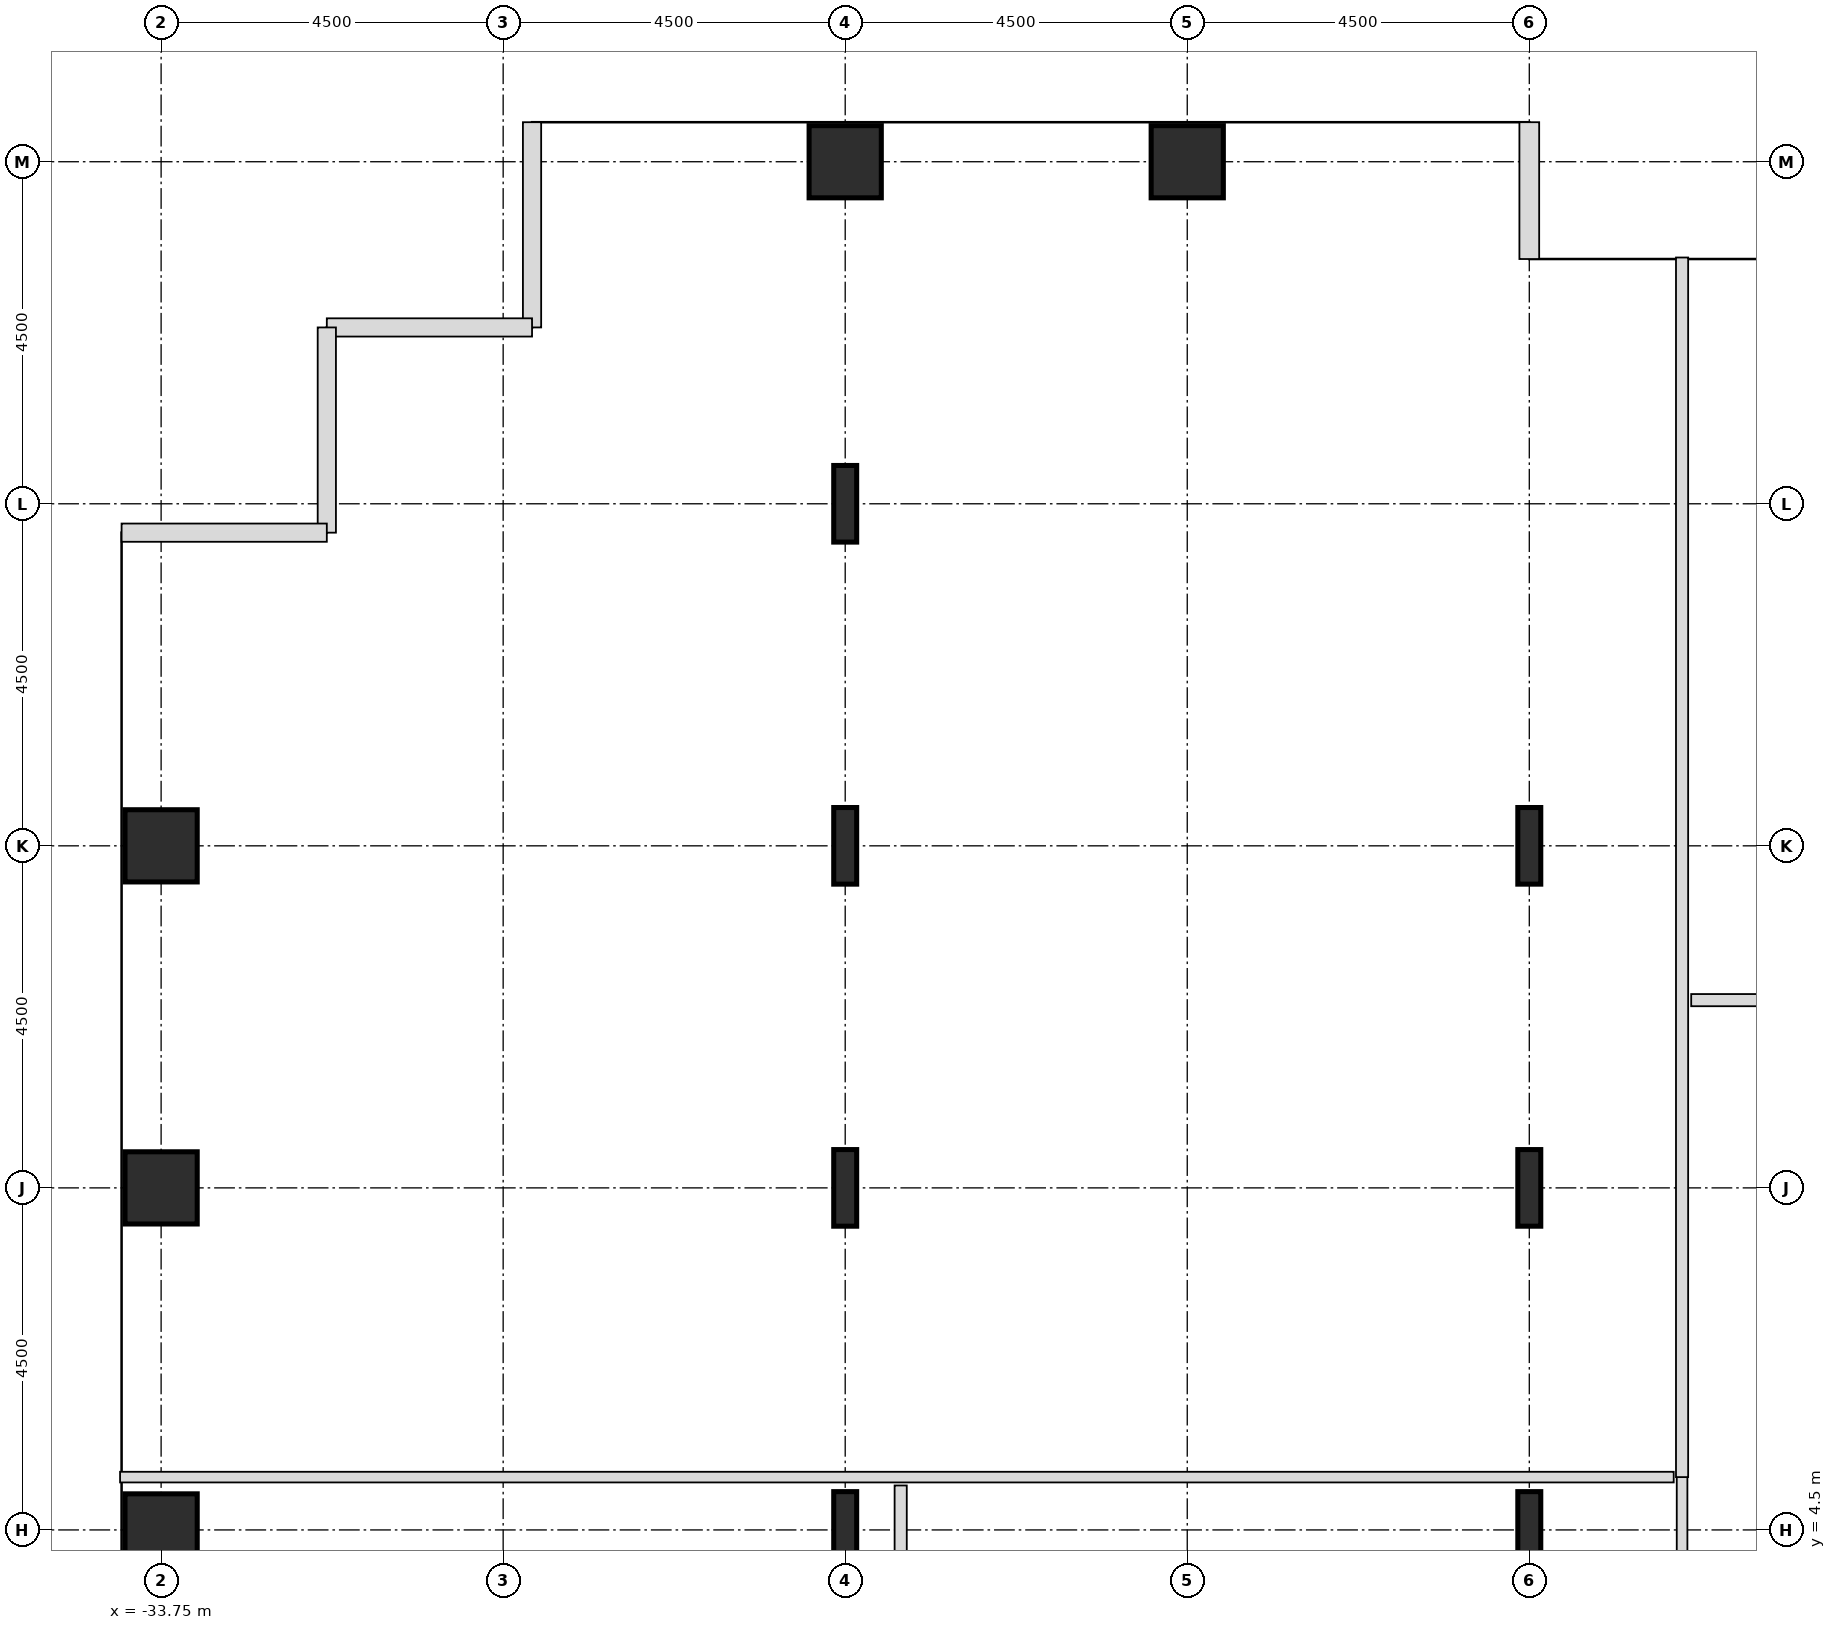
"""IFC4 building model, lengths in metres.
Left out: names, types, materials, properties, quantities, classifications, styles, units other than length and angle.
Written with IfcOpenShell. Run it as: python <this file> out.ifc"""

import sys

from ifc_helpers import new_model, si_unit, direction, frame, frame_2d, origin, origin_2d, place, context, subcontext, project, spatial, rectangle, hollow_rectangle, i_section, extrude, source, transform, mapped, element, fill, save


model = new_model("IFC4")
c1 = context("Model", 3, precision=1e-05, world=origin(), true_north=direction((0.0, 1.0)))
c2 = subcontext(c1, "Body", "Model", "MODEL_VIEW")
j1 = project(units=[si_unit("LENGTHUNIT", "METRE"), si_unit("PLANEANGLEUNIT", "RADIAN")], contexts=[c1])
p1 = place(None, origin())
s1 = spatial("IfcSite", under=j1, at=p1, CompositionType="ELEMENT")
p2 = place(p1, origin())
s2 = spatial("IfcBuilding", under=s1, at=p2, CompositionType="ELEMENT")
p3 = place(p2, frame((0.0, 0.0, 40.6)))
s3 = spatial("IfcBuildingStorey", under=s2, at=p3, CompositionType="ELEMENT", Elevation=40.6)
m1 = source(origin(), c2, "Body", "SweptSolid", [
    extrude(hollow_rectangle(XDim=0.95, YDim=0.95, WallThickness=0.045, InnerFilletRadius=0.045, OuterFilletRadius=0.09, at=origin_2d()), origin(), (0.0, 0.0, 1.0), 3.8),
])
for number, where, z_axis, x_axis in (
    (1, (-33.75, 4.5, 0.0), (0.0, 0.0, 1.0), (1.0, 0.0, 0.0)),
    (2, (-33.75, 9.0, 0.0), (0.0, 0.0, 1.0), (1.0, 0.0, 0.0)),
    (3, (-33.75, 13.5, 0.0), (0.0, 0.0, 1.0), (1.0, 0.0, 0.0)),
):
    element("IfcColumn", number, at=place(p3, frame(where, z_axis=z_axis, x_axis=x_axis)), inside=s3, PredefinedType="COLUMN", context=c2, shape_type="MappedRepresentation", body=[
        mapped(m1, transform((0.0, 0.0, 0.0), x_axis=(1.0, 0.0, 0.0), y_axis=(0.0, 1.0, 0.0), z_axis=(0.0, 0.0, 1.0), scale=1.0)),
    ])
m2 = source(origin(), c2, "Body", "SweptSolid", [
    extrude(i_section(OverallWidth=0.302, OverallDepth=1.008, WebThickness=0.021, FlangeThickness=0.04, FilletRadius=0.03, at=origin_2d()), origin(), (0.0, 0.0, 1.0), 3.8),
])
for number, where, z_axis, x_axis in (
    (4, (-24.75, 4.5, 0.0), (0.0, 0.0, 1.0), (1.0, 0.0, 0.0)),
    (5, (-24.75, 9.0, 0.0), (0.0, 0.0, 1.0), (1.0, 0.0, 0.0)),
    (6, (-24.75, 13.5, 0.0), (0.0, 0.0, 1.0), (1.0, 0.0, 0.0)),
    (7, (-24.75, 18.0, 0.0), (0.0, 0.0, 1.0), (1.0, 0.0, 0.0)),
):
    element("IfcColumn", number, at=place(p3, frame(where, z_axis=z_axis, x_axis=x_axis)), inside=s3, PredefinedType="COLUMN", context=c2, shape_type="MappedRepresentation", body=[
        mapped(m2, transform((0.0, 0.0, 0.0), x_axis=(1.0, 0.0, 0.0), y_axis=(0.0, 1.0, 0.0), z_axis=(0.0, 0.0, 1.0), scale=1.0)),
    ])
for number, where, z_axis, x_axis in (
    (8, (-24.75, 22.5, 0.0), (0.0, 0.0, 1.0), (1.0, 0.0, 0.0)),
    (9, (-20.25, 22.5, 0.0), (0.0, 0.0, 1.0), (1.0, 0.0, 0.0)),
):
    element("IfcColumn", number, at=place(p3, frame(where, z_axis=z_axis, x_axis=x_axis)), inside=s3, PredefinedType="COLUMN", context=c2, shape_type="MappedRepresentation", body=[
        mapped(m1, transform((0.0, 0.0, 0.0), x_axis=(1.0, 0.0, 0.0), y_axis=(0.0, 1.0, 0.0), z_axis=(0.0, 0.0, 1.0), scale=1.0)),
    ])
for number, where, z_axis, x_axis in (
    (10, (-15.75, 4.5, 0.0), (0.0, 0.0, 1.0), (1.0, 0.0, 0.0)),
    (11, (-15.75, 9.0, 0.0), (0.0, 0.0, 1.0), (1.0, 0.0, 0.0)),
    (12, (-15.75, 13.5, 0.0), (0.0, 0.0, 1.0), (1.0, 0.0, 0.0)),
):
    element("IfcColumn", number, at=place(p3, frame(where, z_axis=z_axis, x_axis=x_axis)), inside=s3, PredefinedType="COLUMN", context=c2, shape_type="MappedRepresentation", body=[
        mapped(m2, transform((0.0, 0.0, 0.0), x_axis=(1.0, 0.0, 0.0), y_axis=(0.0, 1.0, 0.0), z_axis=(0.0, 0.0, 1.0), scale=1.0)),
    ])
m3 = source(origin(), c2, "Body", "SweptSolid", [
    extrude(rectangle(XDim=1.8, YDim=0.26, at=frame_2d((0.9, 0.0))), origin(), (0.0, 0.0, 1.0), 3.55),
])
p4 = place(p3, frame((-15.75, 21.22, 0.0), z_axis=(0.0, 0.0, 1.0), x_axis=(0.0, 1.0, 0.0)))
e13 = element("IfcWall", 13, at=p4, inside=s3, PredefinedType="SOLIDWALL", context=c2, shape_type="MappedRepresentation", body=[
    mapped(m3, transform((0.0, 0.0, 0.0), x_axis=(1.0, 0.0, 0.0), y_axis=(0.0, 1.0, 0.0), z_axis=(0.0, 0.0, 1.0), scale=1.0)),
])
m4 = source(origin(), c2, "Body", "SweptSolid", [
    extrude(rectangle(XDim=2.7, YDim=0.24, at=frame_2d((1.35, 0.0))), origin(), (0.0, 0.0, 1.0), 3.55),
])
p5 = place(p3, frame((-28.87, 23.02, 0.0), z_axis=(0.0, 0.0, 1.0), x_axis=(0.0, -1.0, 0.0)))
e14 = element("IfcWall", 14, at=p5, inside=s3, PredefinedType="SHEAR", context=c2, shape_type="MappedRepresentation", body=[
    mapped(m4, transform((0.0, 0.0, 0.0), x_axis=(1.0, 0.0, 0.0), y_axis=(0.0, 1.0, 0.0), z_axis=(0.0, 0.0, 1.0), scale=1.0)),
])
p6 = place(p3, frame((-28.87, 20.32, 0.0), z_axis=(0.0, 0.0, 1.0), x_axis=(-1.0, 0.0, 0.0)))
e15 = element("IfcWall", 15, at=p6, inside=s3, PredefinedType="SHEAR", context=c2, shape_type="MappedRepresentation", body=[
    mapped(m4, transform((0.0, 0.0, 0.0), x_axis=(1.0, 0.0, 0.0), y_axis=(0.0, 1.0, 0.0), z_axis=(0.0, 0.0, 1.0), scale=1.0)),
])
p7 = place(p6, frame((0.75, 0.0, 0.85)))
e16 = element("IfcOpeningElement", 16, at=p7, cuts=e15, PredefinedType="OPENING", context=c2, shape_type="SweptSolid", body=[
    extrude(rectangle(XDim=1.2, YDim=1.8, at=frame_2d((0.6, 0.9))), frame((0.0, 0.13, 0.0), z_axis=(0.0, -1.0, 0.0), x_axis=(1.0, 0.0, 0.0)), (0.0, 0.0, 1.0), 0.26),
])
for number, where, z_axis, x_axis in (
    (17, (-31.57, 20.32, 0.0), (0.0, 0.0, 1.0), (0.0, -1.0, 0.0)),
    (18, (-31.57, 17.62, 0.0), (0.0, 0.0, 1.0), (-1.0, 0.0, 0.0)),
):
    element("IfcWall", number, at=place(p3, frame(where, z_axis=z_axis, x_axis=x_axis)), inside=s3, PredefinedType="SHEAR", context=c2, shape_type="MappedRepresentation", body=[
        mapped(m4, transform((0.0, 0.0, 0.0), x_axis=(1.0, 0.0, 0.0), y_axis=(0.0, 1.0, 0.0), z_axis=(0.0, 0.0, 1.0), scale=1.0)),
    ])
m5 = source(origin(), c2, "Body", "SweptSolid", [
    extrude(rectangle(XDim=6.465, YDim=0.14, at=frame_2d((3.232, 0.0))), origin(), (0.0, 0.0, 1.0), 3.535),
])
p8 = place(p3, frame((-13.74, -1.26, 0.0), z_axis=(0.0, 0.0, 1.0), x_axis=(0.0, 1.0, 0.0)))
e19 = element("IfcWall", 19, at=p8, inside=s3, PredefinedType="PARTITIONING", context=c2, shape_type="MappedRepresentation", body=[
    mapped(m5, transform((0.0, 0.0, 0.0), x_axis=(1.0, 0.0, 0.0), y_axis=(0.0, 1.0, 0.0), z_axis=(0.0, 0.0, 1.0), scale=1.0)),
])
m6 = source(origin(), c2, "Body", "SweptSolid", [
    extrude(rectangle(XDim=20.44, YDim=0.14, at=frame_2d((10.22, 0.0))), origin(), (0.0, 0.0, 1.0), 3.535),
])
p9 = place(p3, frame((-34.29, 5.195, 0.0), z_axis=(0.0, 0.0, 1.0), x_axis=(1.0, 0.0, 0.0)))
e20 = element("IfcWall", 20, at=p9, inside=s3, PredefinedType="PARTITIONING", context=c2, shape_type="MappedRepresentation", body=[
    mapped(m6, transform((0.0, 0.0, 0.0), x_axis=(1.0, 0.0, 0.0), y_axis=(0.0, 1.0, 0.0), z_axis=(0.0, 0.0, 1.0), scale=1.0)),
])
m7 = source(origin(), c2, "Body", "SweptSolid", [
    extrude(rectangle(XDim=13.18, YDim=0.16, at=frame_2d((6.59, 0.0))), origin(), (0.0, 0.0, 1.0), 3.535),
])
p10 = place(p3, frame((-24.02, -8.095, 0.0), z_axis=(0.0, 0.0, 1.0), x_axis=(0.0, 1.0, 0.0)))
e21 = element("IfcWall", 21, at=p10, inside=s3, PredefinedType="PARTITIONING", context=c2, shape_type="MappedRepresentation", body=[
    mapped(m7, transform((0.0, 0.0, 0.0), x_axis=(1.0, 0.0, 0.0), y_axis=(0.0, 1.0, 0.0), z_axis=(0.0, 0.0, 1.0), scale=1.0)),
])
p11 = place(p10, frame((5.37, 0.0, 0.0)))
e22 = element("IfcOpeningElement", 22, at=p11, cuts=e21, PredefinedType="OPENING", context=c2, shape_type="SweptSolid", body=[
    extrude(rectangle(XDim=0.95, YDim=2.1, at=frame_2d((0.475, 1.05))), frame((0.0, 0.09, 0.0), z_axis=(0.0, -1.0, 0.0), x_axis=(1.0, 0.0, 0.0)), (0.0, 0.0, 1.0), 0.18),
])
m8 = source(origin(), c2, "Body", "SweptSolid", [
    extrude(rectangle(XDim=16.045, YDim=0.16, at=frame_2d((8.022, 0.0))), origin(), (0.0, 0.0, 1.0), 3.535),
])
p12 = place(p3, frame((-13.74, 5.195, 0.0), z_axis=(0.0, 0.0, 1.0), x_axis=(0.0, 1.0, 0.0)))
e23 = element("IfcWall", 23, at=p12, inside=s3, PredefinedType="PARTITIONING", context=c2, shape_type="MappedRepresentation", body=[
    mapped(m8, transform((0.0, 0.0, 0.0), x_axis=(1.0, 0.0, 0.0), y_axis=(0.0, 1.0, 0.0), z_axis=(0.0, 0.0, 1.0), scale=1.0)),
])
p13 = place(p12, frame((2.683, 0.0, 0.0)))
e24 = element("IfcOpeningElement", 24, at=p13, cuts=e23, PredefinedType="OPENING", context=c2, shape_type="SweptSolid", body=[
    extrude(rectangle(XDim=0.95, YDim=2.1, at=frame_2d((0.475, 1.05))), frame((0.0, 0.09, 0.0), z_axis=(0.0, -1.0, 0.0), x_axis=(1.0, 0.0, 0.0)), (0.0, 0.0, 1.0), 0.18),
])
m9 = source(origin(), c2, "Body", "SweptSolid", [
    extrude(rectangle(XDim=4.125, YDim=0.16, at=frame_2d((2.062, 0.0))), origin(), (0.0, 0.0, 1.0), 3.535),
])
p14 = place(p3, frame((-13.62, 11.47, 0.0), z_axis=(0.0, 0.0, 1.0), x_axis=(1.0, 0.0, 0.0)))
e25 = element("IfcWall", 25, at=p14, inside=s3, PredefinedType="PARTITIONING", context=c2, shape_type="MappedRepresentation", body=[
    mapped(m9, transform((0.0, 0.0, 0.0), x_axis=(1.0, 0.0, 0.0), y_axis=(0.0, 1.0, 0.0), z_axis=(0.0, 0.0, 1.0), scale=1.0)),
])
p15 = place(p14, frame((1.587, 0.0, 0.0)))
e26 = element("IfcOpeningElement", 26, at=p15, cuts=e25, PredefinedType="OPENING", context=c2, shape_type="SweptSolid", body=[
    extrude(rectangle(XDim=0.95, YDim=2.1, at=frame_2d((0.475, 1.05))), frame((0.0, 0.09, 0.0), z_axis=(0.0, -1.0, 0.0), x_axis=(1.0, 0.0, 0.0)), (0.0, 0.0, 1.0), 0.18),
])
m10 = source(origin(), c2, "Body", "SweptSolid", [
    extrude(rectangle(XDim=1.2, YDim=1.8, at=frame_2d((0.6, 0.9))), frame((0.0, 0.03, 0.0), z_axis=(0.0, -1.0, 0.0), x_axis=(1.0, 0.0, 0.0)), (0.0, 0.0, 1.0), 0.06),
])
p16 = place(p7, origin())
e27 = element("IfcWindow", 27, at=p16, inside=s3, PartitioningType="SINGLE_PANEL", PredefinedType="WINDOW", context=c2, shape_type="MappedRepresentation", body=[
    mapped(m10, transform((0.0, 0.0, 0.0), x_axis=(1.0, 0.0, 0.0), y_axis=(0.0, 1.0, 0.0), z_axis=(0.0, 0.0, 1.0), scale=1.0)),
])
fill(e16, e27)
m11 = source(origin(), c2, "Body", "SweptSolid", [
    extrude(rectangle(XDim=0.95, YDim=2.1, at=frame_2d((0.475, 1.05))), frame((0.0, 0.025, 0.0), z_axis=(0.0, -1.0, 0.0), x_axis=(1.0, 0.0, 0.0)), (0.0, 0.0, 1.0), 0.05),
])
p17 = place(p13, origin())
e28 = element("IfcDoor", 28, at=p17, inside=s3, OperationType="SINGLE_SWING_RIGHT", PredefinedType="DOOR", context=c2, shape_type="MappedRepresentation", body=[
    mapped(m11, transform((0.0, 0.0, 0.0), x_axis=(1.0, 0.0, 0.0), y_axis=(0.0, 1.0, 0.0), z_axis=(0.0, 0.0, 1.0), scale=1.0)),
])
fill(e24, e28)
save(model, sys.argv[1])
